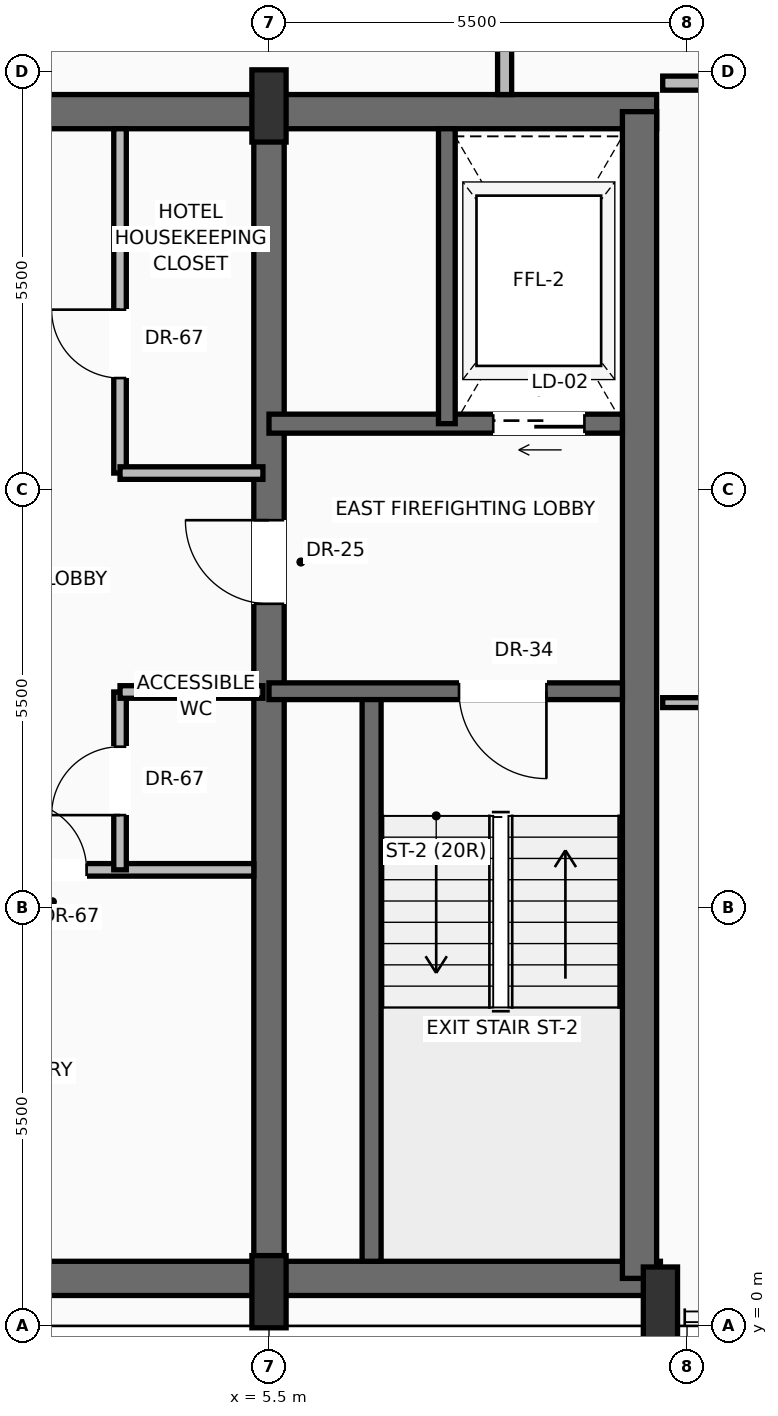
"""IFC4 building model, lengths in metres.
Left out: names, types, materials, properties, quantities, classifications, styles, units other than length and angle.
Written with IfcOpenShell. Run it as: python <this file> out.ifc"""

import sys

from ifc_helpers import new_model, si_unit, direction, frame, frame_2d, origin, origin_2d, place, context, subcontext, project, spatial, rectangle, extrude, source, transform, mapped, element, fill, save


model = new_model("IFC4")
c1 = context("Model", 3, precision=1e-05, world=origin(), true_north=direction((0.0, 1.0)))
c2 = subcontext(c1, "Body", "Model", "MODEL_VIEW")
j1 = project(units=[si_unit("LENGTHUNIT", "METRE"), si_unit("PLANEANGLEUNIT", "RADIAN")], contexts=[c1])
p1 = place(None, origin())
s1 = spatial("IfcSite", under=j1, at=p1, CompositionType="ELEMENT")
p2 = place(p1, origin())
s2 = spatial("IfcBuilding", under=s1, at=p2, CompositionType="ELEMENT")
p3 = place(p2, frame((0.0, 0.0, 276.45)))
s3 = spatial("IfcBuildingStorey", under=s2, at=p3, CompositionType="ELEMENT", Elevation=276.45)
p4 = place(p3, frame((-10.65, 0.625, 0.0), z_axis=(0.0, 0.0, 1.0), x_axis=(1.0, 0.0, 0.0)))
e1 = element("IfcWall", 1, at=p4, inside=s3, PredefinedType="SHEAR", context=c2, shape_type="SweptSolid", body=[
    extrude(rectangle(XDim=21.3, YDim=0.45, at=frame_2d((10.65, 0.0))), origin(), (0.0, 0.0, 1.0), 3.24),
])
p5 = place(p3, frame((-10.6, 15.975, 0.0), z_axis=(0.0, 0.0, 1.0), x_axis=(1.0, 0.0, 0.0)))
e2 = element("IfcWall", 2, at=p5, inside=s3, PredefinedType="SHEAR", context=c2, shape_type="SweptSolid", body=[
    extrude(rectangle(XDim=21.2, YDim=0.45, at=frame_2d((10.6, 0.0))), origin(), (0.0, 0.0, 1.0), 3.24),
])
p6 = place(p5, frame((3.17, 0.0, 0.0)))
e3 = element("IfcOpeningElement", 3, at=p6, cuts=e2, PredefinedType="OPENING", context=c2, shape_type="SweptSolid", body=[
    extrude(rectangle(XDim=1.3, YDim=2.3, at=frame_2d((0.65, 1.15))), frame((0.0, 0.235, 0.0), z_axis=(0.0, -1.0, 0.0), x_axis=(1.0, 0.0, 0.0)), (0.0, 0.0, 1.0), 0.47),
])
p7 = place(p5, frame((9.6, 0.0, 0.0)))
e4 = element("IfcOpeningElement", 4, at=p7, cuts=e2, PredefinedType="OPENING", context=c2, shape_type="SweptSolid", body=[
    extrude(rectangle(XDim=2.0, YDim=2.4, at=frame_2d((1.0, 1.2))), frame((0.0, 0.235, 0.0), z_axis=(0.0, -1.0, 0.0), x_axis=(1.0, 0.0, 0.0)), (0.0, 0.0, 1.0), 0.47),
])
p8 = place(p3, frame((10.375, 0.625, 0.0), z_axis=(0.0, 0.0, 1.0), x_axis=(0.0, 1.0, 0.0)))
e5 = element("IfcWall", 5, at=p8, inside=s3, PredefinedType="SHEAR", context=c2, shape_type="SweptSolid", body=[
    extrude(rectangle(XDim=15.35, YDim=0.45, at=frame_2d((7.675, 0.0))), origin(), (0.0, 0.0, 1.0), 3.24),
])
p9 = place(p3, frame((5.5, 0.625, 0.0), z_axis=(0.0, 0.0, 1.0), x_axis=(0.0, 1.0, 0.0)))
e6 = element("IfcWall", 6, at=p9, inside=s3, PredefinedType="SHEAR", context=c2, shape_type="SweptSolid", body=[
    extrude(rectangle(XDim=15.35, YDim=0.4, at=frame_2d((7.675, 0.0))), origin(), (0.0, 0.0, 1.0), 3.24),
])
p10 = place(p9, frame((8.875, 0.0, 0.0)))
e7 = element("IfcOpeningElement", 7, at=p10, cuts=e6, PredefinedType="OPENING", context=c2, shape_type="SweptSolid", body=[
    extrude(rectangle(XDim=1.1, YDim=2.2, at=frame_2d((0.55, 1.1))), frame((0.0, 0.21, 0.0), z_axis=(0.0, -1.0, 0.0), x_axis=(1.0, 0.0, 0.0)), (0.0, 0.0, 1.0), 0.42),
])
m1 = source(origin(), c2, "Body", "SweptSolid", [
    extrude(rectangle(XDim=0.45, YDim=0.95, at=origin_2d()), origin(), (0.0, 0.0, 1.0), 3.45),
])
for number, where, z_axis, x_axis in (
    (8, (5.5, 0.45, 0.0), (0.0, 0.0, 1.0), (1.0, 0.0, 0.0)),
    (9, (10.65, 0.3, 0.0), (0.0, 0.0, 1.0), (1.0, 0.0, 0.0)),
    (10, (5.5, 16.05, 0.0), (0.0, 0.0, 1.0), (1.0, 0.0, 0.0)),
):
    element("IfcColumn", number, at=place(p3, frame(where, z_axis=z_axis, x_axis=x_axis)), inside=s3, PredefinedType="PILASTER", context=c2, shape_type="MappedRepresentation", body=[
        mapped(m1, transform((0.0, 0.0, 0.0), scale=1.0)),
    ])
p11 = place(p3, frame((7.843, 31.747, 0.0), z_axis=(0.0, 0.0, 1.0), x_axis=(0.50967367276, -0.860367797686, 0.0)))
e11 = element("IfcWall", 11, at=p11, inside=s3, PredefinedType="SOLIDWALL", context=c2, shape_type="SweptSolid", body=[
    extrude(rectangle(XDim=20.018, YDim=0.28, at=frame_2d((10.009, 0.0))), origin(), (0.0, 0.0, 1.0), 2.82),
])
p12 = place(p11, frame((4.804, 0.0, 0.0)))
e12 = element("IfcOpeningElement", 12, at=p12, cuts=e11, PredefinedType="OPENING", context=c2, shape_type="SweptSolid", body=[
    extrude(rectangle(XDim=1.6, YDim=2.35, at=frame_2d((0.8, 1.175))), frame((0.0, 0.15, 0.0), z_axis=(0.0, -1.0, 0.0), x_axis=(1.0, 0.0, 0.0)), (0.0, 0.0, 1.0), 0.3),
])
p13 = place(p11, frame((13.612, 0.0, 0.9)))
e13 = element("IfcOpeningElement", 13, at=p13, cuts=e11, PredefinedType="OPENING", context=c2, shape_type="SweptSolid", body=[
    extrude(rectangle(XDim=2.0, YDim=1.75, at=frame_2d((1.0, 0.875))), frame((0.0, 0.15, 0.0), z_axis=(0.0, -1.0, 0.0), x_axis=(1.0, 0.0, 0.0)), (0.0, 0.0, 1.0), 0.3),
])
p14 = place(p3, frame((6.85, 0.85, 0.0), z_axis=(0.0, 0.0, 1.0), x_axis=(0.0, 1.0, 0.0)))
e14 = element("IfcWall", 14, at=p14, inside=s3, PredefinedType="SOLIDWALL", context=c2, shape_type="SweptSolid", body=[
    extrude(rectangle(XDim=7.5, YDim=0.25, at=frame_2d((3.75, 0.0))), origin(), (0.0, 0.0, 1.0), 3.24),
])
p15 = place(p3, frame((10.15, 8.35, 0.0), z_axis=(0.0, 0.0, 1.0), x_axis=(-1.0, 0.0, 0.0)))
e15 = element("IfcWall", 15, at=p15, inside=s3, PredefinedType="SOLIDWALL", context=c2, shape_type="SweptSolid", body=[
    extrude(rectangle(XDim=4.65, YDim=0.22, at=frame_2d((2.325, 0.0))), origin(), (0.0, 0.0, 1.0), 3.24),
])
p16 = place(p15, frame((1.0, 0.0, 0.0)))
e16 = element("IfcOpeningElement", 16, at=p16, cuts=e15, PredefinedType="OPENING", context=c2, shape_type="SweptSolid", body=[
    extrude(rectangle(XDim=1.15, YDim=2.2, at=frame_2d((0.575, 1.1))), frame((0.0, 0.12, 0.0), z_axis=(0.0, -1.0, 0.0), x_axis=(1.0, 0.0, 0.0)), (0.0, 0.0, 1.0), 0.24),
])
p17 = place(p3, frame((10.15, 11.87, 0.0), z_axis=(0.0, 0.0, 1.0), x_axis=(-1.0, 0.0, 0.0)))
e17 = element("IfcWall", 17, at=p17, inside=s3, PredefinedType="SOLIDWALL", context=c2, shape_type="SweptSolid", body=[
    extrude(rectangle(XDim=4.65, YDim=0.25, at=frame_2d((2.325, 0.0))), origin(), (0.0, 0.0, 1.0), 3.24),
])
p18 = place(p17, frame((0.5, 0.0, 0.0)))
e18 = element("IfcOpeningElement", 18, at=p18, cuts=e17, PredefinedType="OPENING", context=c2, shape_type="SweptSolid", body=[
    extrude(rectangle(XDim=1.2, YDim=2.25, at=frame_2d((0.6, 1.125))), frame((0.0, 0.135, 0.0), z_axis=(0.0, -1.0, 0.0), x_axis=(1.0, 0.0, 0.0)), (0.0, 0.0, 1.0), 0.27),
])
p19 = place(p3, frame((7.84, 11.87, 0.0), z_axis=(0.0, 0.0, 1.0), x_axis=(0.0, 1.0, 0.0)))
e19 = element("IfcWall", 19, at=p19, inside=s3, PredefinedType="SOLIDWALL", context=c2, shape_type="SweptSolid", body=[
    extrude(rectangle(XDim=3.88, YDim=0.22, at=frame_2d((1.94, 0.0))), origin(), (0.0, 0.0, 1.0), 3.24),
])
p20 = place(p3, frame((-5.5, 6.0, 0.0), z_axis=(0.0, 0.0, 1.0), x_axis=(1.0, 0.0, 0.0)))
e20 = element("IfcWall", 20, at=p20, inside=s3, PredefinedType="PARTITIONING", context=c2, shape_type="SweptSolid", body=[
    extrude(rectangle(XDim=10.8, YDim=0.165, at=frame_2d((5.4, 0.0))), origin(), (0.0, 0.0, 1.0), 3.232),
])
p21 = place(p20, frame((7.7, 0.0, 0.0)))
e21 = element("IfcOpeningElement", 21, at=p21, cuts=e20, PredefinedType="OPENING", context=c2, shape_type="SweptSolid", body=[
    extrude(rectangle(XDim=0.9, YDim=2.1, at=frame_2d((0.45, 1.05))), frame((0.0, 0.093, 0.0), z_axis=(0.0, -1.0, 0.0), x_axis=(1.0, 0.0, 0.0)), (0.0, 0.0, 1.0), 0.185),
])
p22 = place(p3, frame((3.54, 6.0, 0.0), z_axis=(0.0, 0.0, 1.0), x_axis=(0.0, 1.0, 0.0)))
e22 = element("IfcWall", 22, at=p22, inside=s3, PredefinedType="PARTITIONING", context=c2, shape_type="SweptSolid", body=[
    extrude(rectangle(XDim=2.34, YDim=0.165, at=frame_2d((1.17, 0.0))), origin(), (0.0, 0.0, 1.0), 3.232),
])
p23 = place(p22, frame((0.72, 0.0, 0.0)))
e23 = element("IfcOpeningElement", 23, at=p23, cuts=e22, PredefinedType="OPENING", context=c2, shape_type="SweptSolid", body=[
    extrude(rectangle(XDim=0.9, YDim=2.1, at=frame_2d((0.45, 1.05))), frame((0.0, 0.093, 0.0), z_axis=(0.0, -1.0, 0.0), x_axis=(1.0, 0.0, 0.0)), (0.0, 0.0, 1.0), 0.185),
])
p24 = place(p3, frame((3.54, 8.34, 0.0), z_axis=(0.0, 0.0, 1.0), x_axis=(1.0, 0.0, 0.0)))
e24 = element("IfcWall", 24, at=p24, inside=s3, PredefinedType="PARTITIONING", context=c2, shape_type="SweptSolid", body=[
    extrude(rectangle(XDim=1.88, YDim=0.165, at=frame_2d((0.94, 0.0))), origin(), (0.0, 0.0, 1.0), 3.232),
])
p25 = place(p3, frame((3.54, 11.22, 0.0), z_axis=(0.0, 0.0, 1.0), x_axis=(0.0, 1.0, 0.0)))
e25 = element("IfcWall", 25, at=p25, inside=s3, PredefinedType="PARTITIONING", context=c2, shape_type="SweptSolid", body=[
    extrude(rectangle(XDim=4.53, YDim=0.165, at=frame_2d((2.265, 0.0))), origin(), (0.0, 0.0, 1.0), 3.232),
])
p26 = place(p25, frame((1.25, 0.0, 0.0)))
e26 = element("IfcOpeningElement", 26, at=p26, cuts=e25, PredefinedType="OPENING", context=c2, shape_type="SweptSolid", body=[
    extrude(rectangle(XDim=0.9, YDim=2.1, at=frame_2d((0.45, 1.05))), frame((0.0, 0.093, 0.0), z_axis=(0.0, -1.0, 0.0), x_axis=(1.0, 0.0, 0.0)), (0.0, 0.0, 1.0), 0.185),
])
p27 = place(p3, frame((3.54, 11.22, 0.0), z_axis=(0.0, 0.0, 1.0), x_axis=(1.0, 0.0, 0.0)))
e27 = element("IfcWall", 27, at=p27, inside=s3, PredefinedType="PARTITIONING", context=c2, shape_type="SweptSolid", body=[
    extrude(rectangle(XDim=1.88, YDim=0.165, at=frame_2d((0.94, 0.0))), origin(), (0.0, 0.0, 1.0), 3.232),
])
p28 = place(p3, frame((8.6, 16.2, 0.0), z_axis=(0.0, 0.0, 1.0), x_axis=(0.0, 1.0, 0.0)))
e28 = element("IfcWall", 28, at=p28, inside=s3, PredefinedType="PARTITIONING", context=c2, shape_type="SweptSolid", body=[
    extrude(rectangle(XDim=12.4, YDim=0.185, at=frame_2d((6.2, 0.0))), origin(), (0.0, 0.0, 1.0), 3.232),
])
p29 = place(p28, frame((3.218, 0.0, 0.0)))
e29 = element("IfcOpeningElement", 29, at=p29, cuts=e28, PredefinedType="OPENING", context=c2, shape_type="SweptSolid", body=[
    extrude(rectangle(XDim=1.05, YDim=2.25, at=frame_2d((0.525, 1.125))), frame((0.0, 0.103, 0.0), z_axis=(0.0, -1.0, 0.0), x_axis=(1.0, 0.0, 0.0)), (0.0, 0.0, 1.0), 0.205),
])
p30 = place(p28, frame((8.936, 0.0, 0.0)))
e30 = element("IfcOpeningElement", 30, at=p30, cuts=e28, PredefinedType="OPENING", context=c2, shape_type="SweptSolid", body=[
    extrude(rectangle(XDim=1.05, YDim=2.25, at=frame_2d((0.525, 1.125))), frame((0.0, 0.103, 0.0), z_axis=(0.0, -1.0, 0.0), x_axis=(1.0, 0.0, 0.0)), (0.0, 0.0, 1.0), 0.205),
])
p31 = place(p3, frame((10.68, 16.35, 0.0), z_axis=(0.0, 0.0, 1.0), x_axis=(1.0, 0.0, 0.0)))
e31 = element("IfcWall", 31, at=p31, inside=s3, PredefinedType="PARTITIONING", context=c2, shape_type="SweptSolid", body=[
    extrude(rectangle(XDim=6.435, YDim=0.185, at=frame_2d((3.218, 0.0))), origin(), (0.0, 0.0, 1.0), 3.232),
])
p32 = place(p31, frame((1.829, 0.0, 0.0)))
e32 = element("IfcOpeningElement", 32, at=p32, cuts=e31, PredefinedType="OPENING", context=c2, shape_type="SweptSolid", body=[
    extrude(rectangle(XDim=1.05, YDim=2.25, at=frame_2d((0.525, 1.125))), frame((0.0, 0.103, 0.0), z_axis=(0.0, -1.0, 0.0), x_axis=(1.0, 0.0, 0.0)), (0.0, 0.0, 1.0), 0.205),
])
p33 = place(p3, frame((10.68, 8.2, 0.0), z_axis=(0.0, 0.0, 1.0), x_axis=(1.0, 0.0, 0.0)))
e33 = element("IfcWall", 33, at=p33, inside=s3, PredefinedType="PARTITIONING", context=c2, shape_type="SweptSolid", body=[
    extrude(rectangle(XDim=11.263, YDim=0.13, at=frame_2d((5.632, 0.0))), origin(), (0.0, 0.0, 1.0), 3.232),
])
p34 = place(p33, frame((4.627, 0.0, 0.0)))
e34 = element("IfcOpeningElement", 34, at=p34, cuts=e33, PredefinedType="OPENING", context=c2, shape_type="SweptSolid", body=[
    extrude(rectangle(XDim=0.95, YDim=2.2, at=frame_2d((0.475, 1.1))), frame((0.0, 0.075, 0.0), z_axis=(0.0, -1.0, 0.0), x_axis=(1.0, 0.0, 0.0)), (0.0, 0.0, 1.0), 0.15),
])
m2 = source(origin(), c2, "Body", "SweptSolid", [
    extrude(rectangle(XDim=1.15, YDim=2.2, at=frame_2d((0.575, 1.1))), frame((0.0, 0.025, 0.0), z_axis=(0.0, -1.0, 0.0), x_axis=(1.0, 0.0, 0.0)), (0.0, 0.0, 1.0), 0.05),
])
p35 = place(p16, origin())
e35 = element("IfcDoor", 35, at=p35, inside=s3, OperationType="SINGLE_SWING_LEFT", PredefinedType="DOOR", context=c2, shape_type="MappedRepresentation", body=[
    mapped(m2, transform((0.0, 0.0, 0.0), scale=1.0)),
])
fill(e16, e35)
m3 = source(origin(), c2, "Body", "SweptSolid", [
    extrude(rectangle(XDim=1.1, YDim=2.2, at=frame_2d((0.55, 1.1))), frame((0.0, 0.025, 0.0), z_axis=(0.0, -1.0, 0.0), x_axis=(1.0, 0.0, 0.0)), (0.0, 0.0, 1.0), 0.05),
])
p36 = place(p10, origin())
e36 = element("IfcDoor", 36, at=p36, inside=s3, OperationType="SINGLE_SWING_RIGHT", PredefinedType="DOOR", context=c2, shape_type="MappedRepresentation", body=[
    mapped(m3, transform((0.0, 0.0, 0.0), scale=1.0)),
])
fill(e7, e36)
m4 = source(origin(), c2, "Body", "SweptSolid", [
    extrude(rectangle(XDim=1.2, YDim=2.25, at=frame_2d((0.6, 1.125))), frame((0.0, 0.025, 0.0), z_axis=(0.0, -1.0, 0.0), x_axis=(1.0, 0.0, 0.0)), (0.0, 0.0, 1.0), 0.05),
])
p37 = place(p18, origin())
e37 = element("IfcDoor", 37, at=p37, inside=s3, OperationType="SLIDING_TO_RIGHT", PredefinedType="DOOR", context=c2, shape_type="MappedRepresentation", body=[
    mapped(m4, transform((0.0, 0.0, 0.0), scale=1.0)),
])
fill(e18, e37)
m5 = source(origin(), c2, "Body", "SweptSolid", [
    extrude(rectangle(XDim=0.9, YDim=2.1, at=frame_2d((0.45, 1.05))), frame((0.0, 0.025, 0.0), z_axis=(0.0, -1.0, 0.0), x_axis=(1.0, 0.0, 0.0)), (0.0, 0.0, 1.0), 0.05),
])
p38 = place(p21, origin())
e38 = element("IfcDoor", 38, at=p38, inside=s3, OperationType="SINGLE_SWING_LEFT", PredefinedType="DOOR", context=c2, shape_type="MappedRepresentation", body=[
    mapped(m5, transform((0.0, 0.0, 0.0), scale=1.0)),
])
fill(e21, e38)
p39 = place(p23, origin())
e39 = element("IfcDoor", 39, at=p39, inside=s3, OperationType="SINGLE_SWING_LEFT", PredefinedType="DOOR", context=c2, shape_type="MappedRepresentation", body=[
    mapped(m5, transform((0.0, 0.0, 0.0), scale=1.0)),
])
fill(e23, e39)
p40 = place(p26, origin())
e40 = element("IfcDoor", 40, at=p40, inside=s3, OperationType="SINGLE_SWING_RIGHT", PredefinedType="DOOR", context=c2, shape_type="MappedRepresentation", body=[
    mapped(m5, transform((0.0, 0.0, 0.0), scale=1.0)),
])
fill(e26, e40)
save(model, sys.argv[1])
